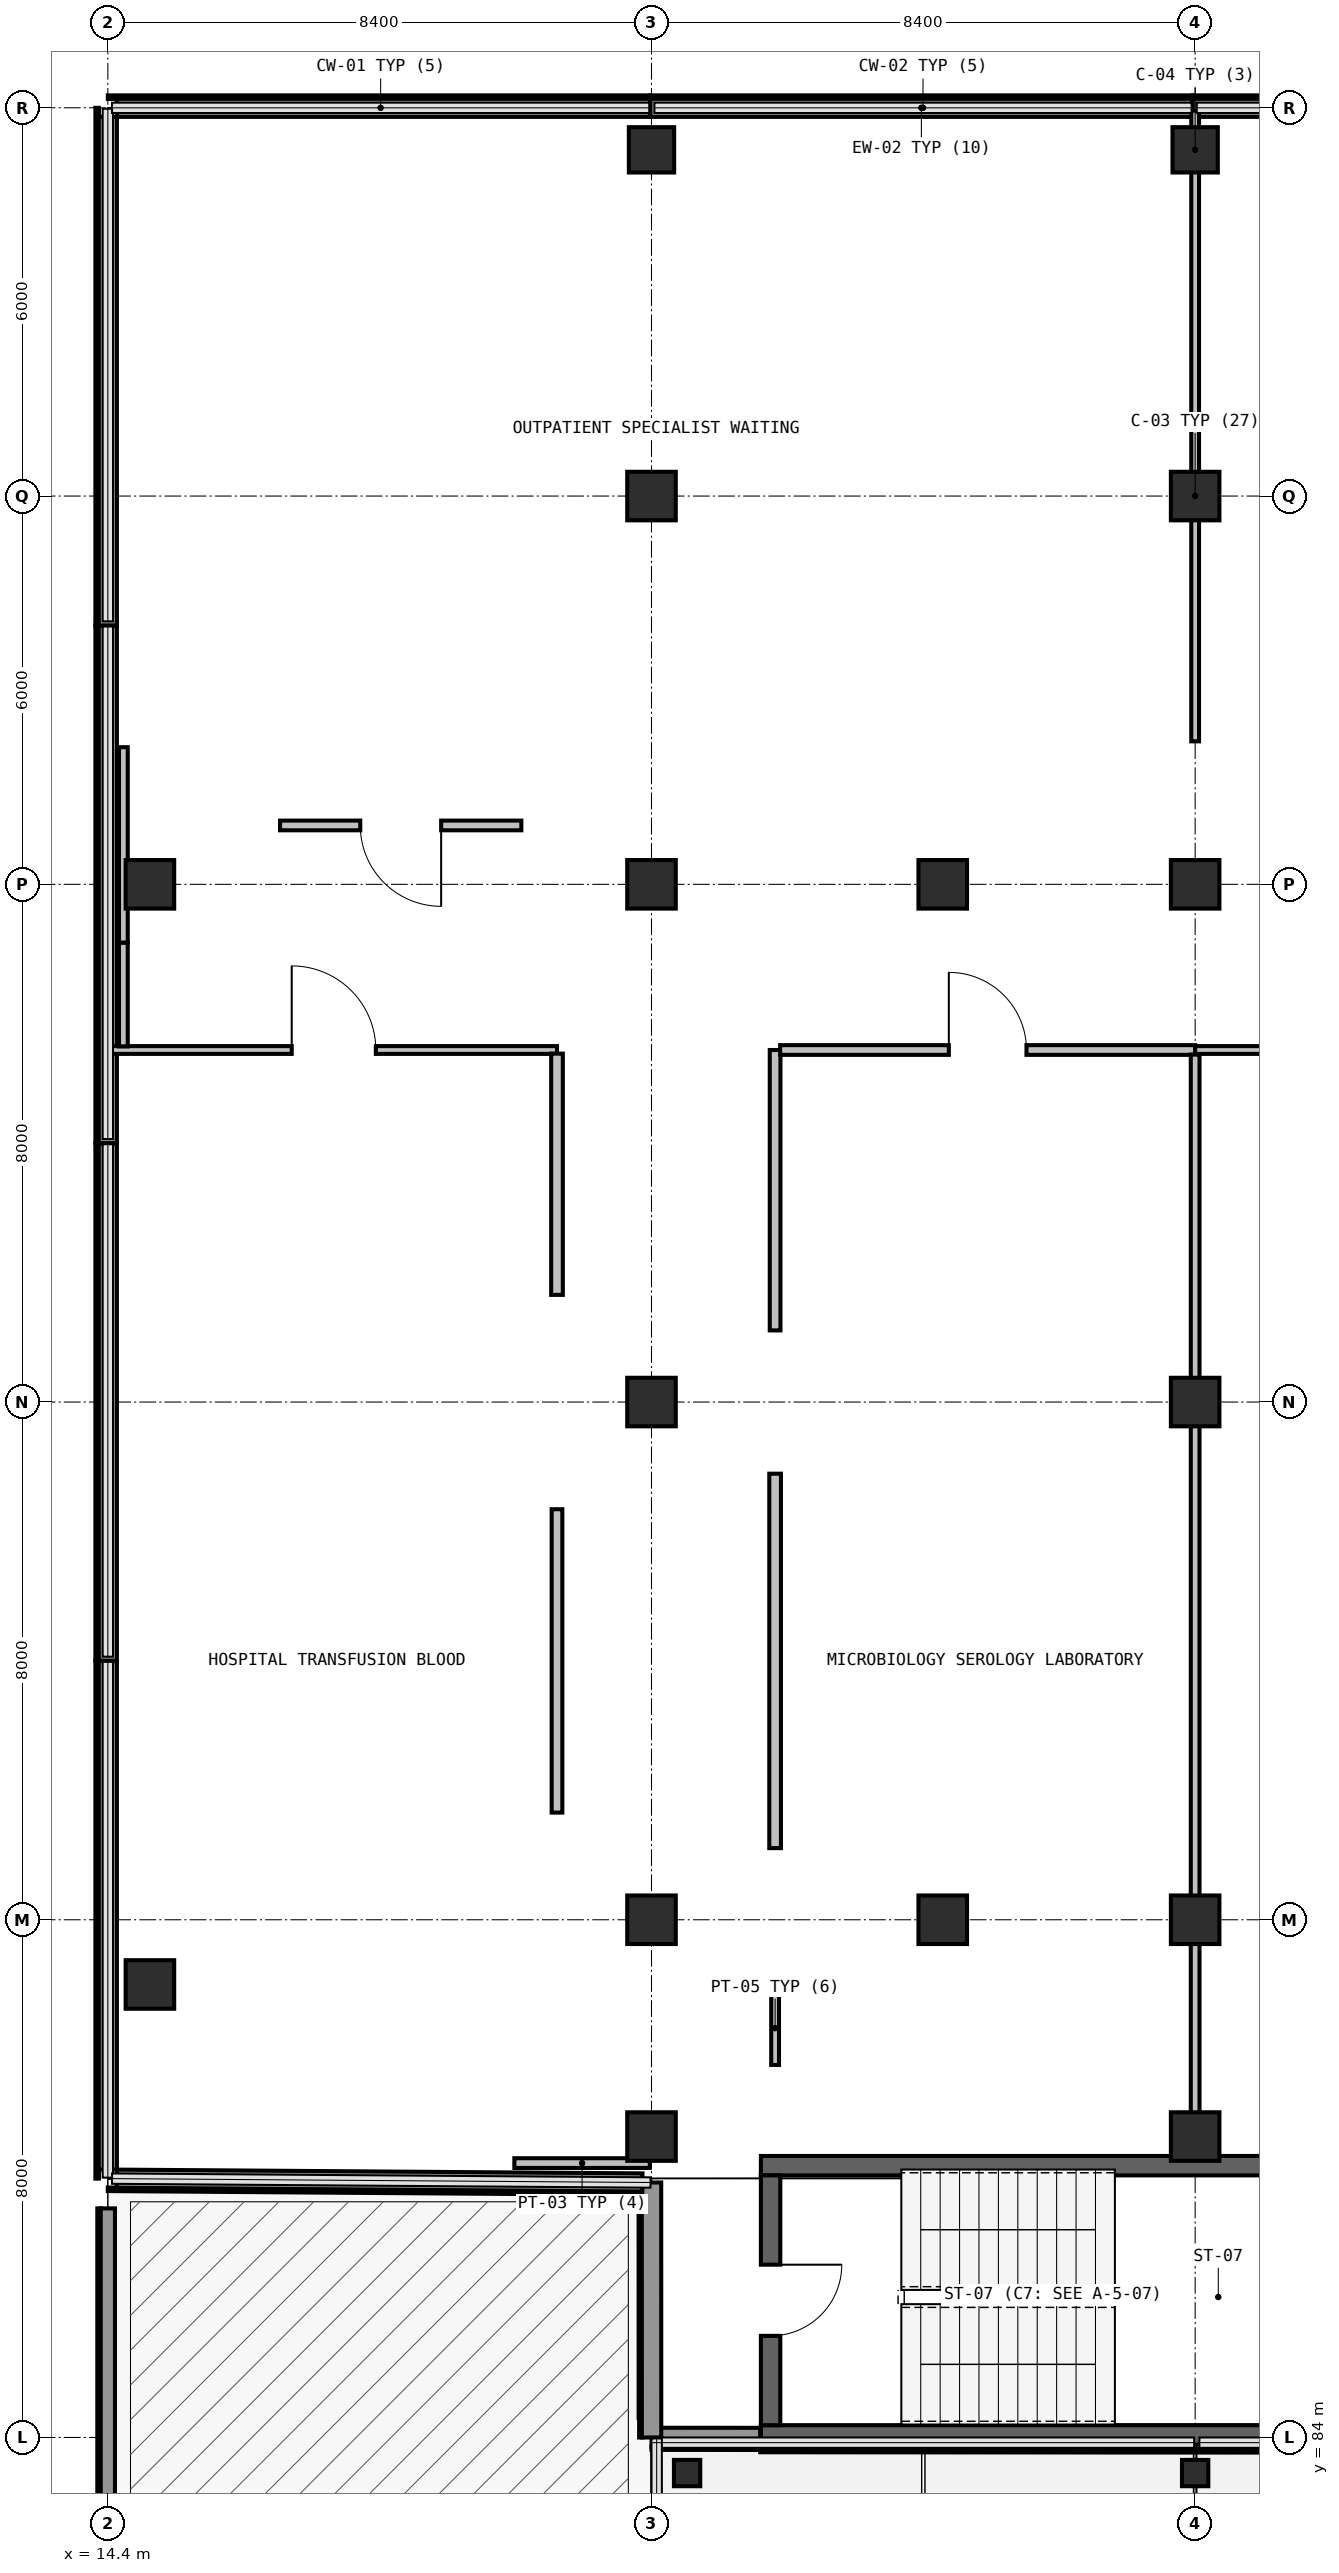
"""IFC4 building model, lengths in metres.
Left out: names, types, materials, properties, quantities, classifications, styles, units other than length and angle.
Written with IfcOpenShell. Run it as: python <this file> out.ifc"""

import sys

from ifc_helpers import new_model, si_unit, direction, frame, frame_2d, origin, origin_2d, place, context, subcontext, project, spatial, rectangle, hollow_circle, extrude, element, fill, save


model = new_model("IFC4")
c1 = context("Model", 3, precision=1e-05, world=origin(), true_north=direction((0.0, 1.0)))
c2 = subcontext(c1, "Body", "Model", "MODEL_VIEW")
j1 = project(units=[si_unit("LENGTHUNIT", "METRE"), si_unit("PLANEANGLEUNIT", "RADIAN")], contexts=[c1])
p1 = place(None, origin())
s1 = spatial("IfcSite", under=j1, at=p1, CompositionType="ELEMENT")
p2 = place(p1, origin())
s2 = spatial("IfcBuilding", under=s1, at=p2, CompositionType="ELEMENT")
p3 = place(p2, frame((0.0, 0.0, 15.0)))
s3 = spatial("IfcBuildingStorey", under=s2, at=p3, CompositionType="ELEMENT", Elevation=15.0)
for number, where, z_axis, x_axis in (
    (1, (23.35, 83.45, 0.0), (0.0, 0.0, 1.0), (1.0, 0.0, 0.0)),
    (2, (31.2, 83.45, 0.0), (0.0, 0.0, 1.0), (1.0, 0.0, 0.0)),
):
    element("IfcColumn", number, at=place(p3, frame(where, z_axis=z_axis, x_axis=x_axis)), inside=s3, PredefinedType="COLUMN", context=c2, shape_type="SweptSolid", body=[
        extrude(hollow_circle(Radius=0.203, WallThickness=0.016, at=origin_2d()), origin(), (0.0, 0.0, 1.0), 3.155),
    ])
for number, where, z_axis, x_axis in (
    (3, (15.05, 91.0, 0.0), (0.0, 0.0, 1.0), (1.0, 0.0, 0.0)),
    (4, (27.3, 92.0, 0.0), (0.0, 0.0, 1.0), (1.0, 0.0, 0.0)),
    (5, (27.3, 108.0, 0.0), (0.0, 0.0, 1.0), (1.0, 0.0, 0.0)),
    (6, (15.05, 108.0, 0.0), (0.0, 0.0, 1.0), (1.0, 0.0, 0.0)),
    (7, (22.8, 88.65, 0.0), (0.0, 0.0, 1.0), (1.0, 0.0, 0.0)),
    (8, (22.8, 92.0, 0.0), (0.0, 0.0, 1.0), (1.0, 0.0, 0.0)),
    (9, (22.8, 100.0, 0.0), (0.0, 0.0, 1.0), (1.0, 0.0, 0.0)),
    (10, (22.8, 108.0, 0.0), (0.0, 0.0, 1.0), (1.0, 0.0, 0.0)),
    (11, (22.8, 114.0, 0.0), (0.0, 0.0, 1.0), (1.0, 0.0, 0.0)),
):
    element("IfcColumn", number, at=place(p3, frame(where, z_axis=z_axis, x_axis=x_axis)), inside=s3, PredefinedType="COLUMN", context=c2, shape_type="SweptSolid", body=[
        extrude(rectangle(XDim=0.75, YDim=0.75, at=origin_2d()), origin(), (0.0, 0.0, 1.0), 4.2),
    ])
p4 = place(p3, frame((22.8, 119.35, 0.0), z_axis=(0.0, 0.0, 1.0), x_axis=(1.0, 0.0, 0.0)))
e12 = element("IfcColumn", 12, at=p4, inside=s3, PredefinedType="COLUMN", context=c2, shape_type="SweptSolid", body=[
    extrude(rectangle(XDim=0.7, YDim=0.7, at=origin_2d()), origin(), (0.0, 0.0, 1.0), 4.2),
])
for number, where, z_axis, x_axis in (
    (13, (31.2, 88.65, 0.0), (0.0, 0.0, 1.0), (1.0, 0.0, 0.0)),
    (14, (31.2, 92.0, 0.0), (0.0, 0.0, 1.0), (1.0, 0.0, 0.0)),
    (15, (31.2, 100.0, 0.0), (0.0, 0.0, 1.0), (1.0, 0.0, 0.0)),
    (16, (31.2, 108.0, 0.0), (0.0, 0.0, 1.0), (1.0, 0.0, 0.0)),
    (17, (31.2, 114.0, 0.0), (0.0, 0.0, 1.0), (1.0, 0.0, 0.0)),
):
    element("IfcColumn", number, at=place(p3, frame(where, z_axis=z_axis, x_axis=x_axis)), inside=s3, PredefinedType="COLUMN", context=c2, shape_type="SweptSolid", body=[
        extrude(rectangle(XDim=0.75, YDim=0.75, at=origin_2d()), origin(), (0.0, 0.0, 1.0), 4.2),
    ])
p5 = place(p3, frame((31.2, 119.35, 0.0), z_axis=(0.0, 0.0, 1.0), x_axis=(1.0, 0.0, 0.0)))
e18 = element("IfcColumn", 18, at=p5, inside=s3, PredefinedType="COLUMN", context=c2, shape_type="SweptSolid", body=[
    extrude(rectangle(XDim=0.7, YDim=0.7, at=origin_2d()), origin(), (0.0, 0.0, 1.0), 4.2),
])
p6 = place(p3, frame((14.4, 88.14, 0.0), z_axis=(0.0, 0.0, 1.0), x_axis=(0.0, 1.0, 0.0)))
e19 = element("IfcWall", 19, at=p6, inside=s3, PredefinedType="SOLIDWALL", context=c2, shape_type="SweptSolid", body=[
    extrude(rectangle(XDim=7.858, YDim=0.28, at=frame_2d((3.929, 0.0))), origin(), (0.0, 0.0, 1.0), 0.94),
])
p7 = place(p3, frame((14.4, 96.002, 0.0), z_axis=(0.0, 0.0, 1.0), x_axis=(0.0, 1.0, 0.0)))
e20 = element("IfcWall", 20, at=p7, inside=s3, PredefinedType="SOLIDWALL", context=c2, shape_type="SweptSolid", body=[
    extrude(rectangle(XDim=7.995, YDim=0.28, at=frame_2d((3.998, 0.0))), origin(), (0.0, 0.0, 1.0), 0.94),
])
p8 = place(p3, frame((14.4, 104.001, 0.0), z_axis=(0.0, 0.0, 1.0), x_axis=(0.0, 1.0, 0.0)))
e21 = element("IfcWall", 21, at=p8, inside=s3, PredefinedType="SOLIDWALL", context=c2, shape_type="SweptSolid", body=[
    extrude(rectangle(XDim=7.996, YDim=0.28, at=frame_2d((3.998, 0.0))), origin(), (0.0, 0.0, 1.0), 0.94),
])
p9 = place(p3, frame((14.4, 112.001, 0.0), z_axis=(0.0, 0.0, 1.0), x_axis=(0.0, 1.0, 0.0)))
e22 = element("IfcWall", 22, at=p9, inside=s3, PredefinedType="SOLIDWALL", context=c2, shape_type="SweptSolid", body=[
    extrude(rectangle(XDim=7.858, YDim=0.28, at=frame_2d((3.929, 0.0))), origin(), (0.0, 0.0, 1.0), 0.94),
])
p10 = place(p3, frame((14.54, 119.999, 0.0), z_axis=(0.0, 0.0, 1.0), x_axis=(1.0, 0.0, 0.0)))
e23 = element("IfcWall", 23, at=p10, inside=s3, PredefinedType="SOLIDWALL", context=c2, shape_type="SweptSolid", body=[
    extrude(rectangle(XDim=8.238, YDim=0.28, at=frame_2d((4.119, 0.0))), origin(), (0.0, 0.0, 1.0), 0.94),
])
for number, where, z_axis, x_axis in (
    (24, (22.782, 119.999, 0.0), (0.0, 0.0, 1.0), (1.0, 0.0, 0.0)),
    (25, (31.162, 119.999, 0.0), (0.0, 0.0, 1.0), (1.0, 0.0, 0.0)),
):
    element("IfcWall", number, at=place(p3, frame(where, z_axis=z_axis, x_axis=x_axis)), inside=s3, PredefinedType="SOLIDWALL", context=c2, shape_type="SweptSolid", body=[
        extrude(rectangle(XDim=8.376, YDim=0.28, at=frame_2d((4.188, 0.0))), origin(), (0.0, 0.0, 1.0), 0.94),
    ])
p11 = place(p3, frame((24.48, 83.999, 0.0), z_axis=(0.0, 0.0, 1.0), x_axis=(-0.999999830842, 0.000581648876, 0.0)))
e26 = element("IfcWall", 26, at=p11, inside=s3, PredefinedType="SOLIDWALL", context=c2, shape_type="SweptSolid", body=[
    extrude(rectangle(XDim=1.679, YDim=0.3, at=frame_2d((0.839, 0.0))), origin(), (0.0, 0.0, 1.0), 3.895),
])
p12 = place(p3, frame((22.801, 84.0, 0.0), z_axis=(0.0, 0.0, 1.0), x_axis=(-0.000247862181, 0.999999969282, 0.0)))
e27 = element("IfcWall", 27, at=p12, inside=s3, PredefinedType="SOLIDWALL", context=c2, shape_type="SweptSolid", body=[
    extrude(rectangle(XDim=3.94, YDim=0.3, at=frame_2d((1.97, 0.0))), origin(), (0.0, 0.0, 1.0), 3.895),
])
p13 = place(p3, frame((22.66, 87.941, 0.0), z_axis=(0.0, 0.0, 1.0), x_axis=(-0.999974397117, 0.007155774573, 0.0)))
e28 = element("IfcWall", 28, at=p13, inside=s3, PredefinedType="SOLIDWALL", context=c2, shape_type="SweptSolid", body=[
    extrude(rectangle(XDim=8.12, YDim=0.28, at=frame_2d((4.06, 0.0))), origin(), (0.0, 0.0, 1.0), 0.94),
])
p14 = place(p3, frame((14.4, 52.108, 0.05), z_axis=(0.0, 0.0, 1.0), x_axis=(0.0, 1.0, 0.0)))
e29 = element("IfcWall", 29, at=p14, inside=s3, PredefinedType="PARAPET", context=c2, shape_type="SweptSolid", body=[
    extrude(rectangle(XDim=35.432, YDim=0.22, at=frame_2d((17.716, 0.0))), origin(), (0.0, 0.0, 1.0), 1.15),
])
for number, where, z_axis, x_axis in (
    (30, (24.49, 84.04, 0.0), (0.0, 0.0, 1.0), (1.0, 0.0, 0.0)),
    (31, (33.51, 88.2, 0.0), (0.0, 0.0, 1.0), (-1.0, 0.0, 0.0)),
):
    element("IfcWall", number, at=place(p3, frame(where, z_axis=z_axis, x_axis=x_axis)), inside=s3, PredefinedType="SHEAR", context=c2, shape_type="SweptSolid", body=[
        extrude(rectangle(XDim=9.02, YDim=0.3, at=frame_2d((4.51, 0.0))), origin(), (0.0, 0.0, 1.0), 3.895),
    ])
p15 = place(p3, frame((24.64, 88.05, 0.0), z_axis=(0.0, 0.0, 1.0), x_axis=(0.0, -1.0, 0.0)))
e32 = element("IfcWall", 32, at=p15, inside=s3, PredefinedType="SHEAR", context=c2, shape_type="SweptSolid", body=[
    extrude(rectangle(XDim=3.86, YDim=0.3, at=frame_2d((1.93, 0.0))), origin(), (0.0, 0.0, 1.0), 3.895),
])
p16 = place(p15, frame((1.38, 0.0, 0.0)))
e33 = element("IfcOpeningElement", 33, at=p16, cuts=e32, PredefinedType="OPENING", context=c2, shape_type="SweptSolid", body=[
    extrude(rectangle(XDim=1.1, YDim=2.15, at=frame_2d((0.55, 1.075))), frame((0.0, 0.16, 0.0), z_axis=(0.0, -1.0, 0.0), x_axis=(1.0, 0.0, 0.0)), (0.0, 0.0, 1.0), 0.32),
])
p17 = place(p3, frame((24.71, 89.757, 0.0), z_axis=(0.0, 0.0, 1.0), x_axis=(0.0, 1.0, 0.0)))
e34 = element("IfcWall", 34, at=p17, inside=s3, PredefinedType="PARTITIONING", context=c2, shape_type="SweptSolid", body=[
    extrude(rectangle(XDim=1.136, YDim=0.12, at=frame_2d((0.568, 0.0))), origin(), (0.0, 0.0, 1.0), 3.895),
])
p18 = place(p3, frame((24.71, 93.107, 0.0), z_axis=(0.0, 0.0, 1.0), x_axis=(0.0, 1.0, 0.0)))
e35 = element("IfcWall", 35, at=p18, inside=s3, PredefinedType="PARTITIONING", context=c2, shape_type="SweptSolid", body=[
    extrude(rectangle(XDim=5.786, YDim=0.18, at=frame_2d((2.893, 0.0))), origin(), (0.0, 0.0, 1.0), 3.895),
])
p19 = place(p3, frame((24.71, 101.107, 0.0), z_axis=(0.0, 0.0, 1.0), x_axis=(0.0, 1.0, 0.0)))
e36 = element("IfcWall", 36, at=p19, inside=s3, PredefinedType="PARTITIONING", context=c2, shape_type="SweptSolid", body=[
    extrude(rectangle(XDim=4.333, YDim=0.165, at=frame_2d((2.167, 0.0))), origin(), (0.0, 0.0, 1.0), 3.895),
])
p20 = place(p3, frame((24.788, 105.44, 0.0), z_axis=(0.0, 0.0, 1.0), x_axis=(1.0, 0.0, 0.0)))
e37 = element("IfcWall", 37, at=p20, inside=s3, PredefinedType="PARTITIONING", context=c2, shape_type="SweptSolid", body=[
    extrude(rectangle(XDim=6.412, YDim=0.15, at=frame_2d((3.206, 0.0))), origin(), (0.0, 0.0, 1.0), 3.895),
])
p21 = place(p20, frame((2.606, 0.0, 0.0)))
e38 = element("IfcOpeningElement", 38, at=p21, cuts=e37, PredefinedType="OPENING", context=c2, shape_type="SweptSolid", body=[
    extrude(rectangle(XDim=1.2, YDim=2.15, at=frame_2d((0.6, 1.075))), frame((0.0, 0.085, 0.0), z_axis=(0.0, -1.0, 0.0), x_axis=(1.0, 0.0, 0.0)), (0.0, 0.0, 1.0), 0.17),
])
p22 = place(p3, frame((31.2, 105.369, 0.0), z_axis=(0.0, 0.0, 1.0), x_axis=(0.0, -1.0, 0.0)))
e39 = element("IfcWall", 39, at=p22, inside=s3, PredefinedType="PARTITIONING", context=c2, shape_type="SweptSolid", body=[
    extrude(rectangle(XDim=17.022, YDim=0.135, at=frame_2d((8.511, 0.0))), origin(), (0.0, 0.0, 1.0), 3.245),
])
p23 = place(p3, frame((14.442, 105.44, 0.0), z_axis=(0.0, 0.0, 1.0), x_axis=(1.0, 0.0, 0.0)))
e40 = element("IfcWall", 40, at=p23, inside=s3, PredefinedType="PARTITIONING", context=c2, shape_type="SweptSolid", body=[
    extrude(rectangle(XDim=6.898, YDim=0.12, at=frame_2d((3.449, 0.0))), origin(), (0.0, 0.0, 1.0), 3.895),
])
p24 = place(p23, frame((2.799, 0.0, 0.0)))
e41 = element("IfcOpeningElement", 41, at=p24, cuts=e40, PredefinedType="OPENING", context=c2, shape_type="SweptSolid", body=[
    extrude(rectangle(XDim=1.3, YDim=2.15, at=frame_2d((0.65, 1.075))), frame((0.0, 0.07, 0.0), z_axis=(0.0, -1.0, 0.0), x_axis=(1.0, 0.0, 0.0)), (0.0, 0.0, 1.0), 0.14),
])
p25 = place(p3, frame((21.34, 105.384, 0.0), z_axis=(0.0, 0.0, 1.0), x_axis=(0.0, -1.0, 0.0)))
e42 = element("IfcWall", 42, at=p25, inside=s3, PredefinedType="PARTITIONING", context=c2, shape_type="SweptSolid", body=[
    extrude(rectangle(XDim=3.728, YDim=0.18, at=frame_2d((1.864, 0.0))), origin(), (0.0, 0.0, 1.0), 3.895),
])
p26 = place(p3, frame((21.34, 98.344, 0.0), z_axis=(0.0, 0.0, 1.0), x_axis=(0.0, -1.0, 0.0)))
e43 = element("IfcWall", 43, at=p26, inside=s3, PredefinedType="PARTITIONING", context=c2, shape_type="SweptSolid", body=[
    extrude(rectangle(XDim=4.688, YDim=0.165, at=frame_2d((2.344, 0.0))), origin(), (0.0, 0.0, 1.0), 3.895),
])
p27 = place(p3, frame((20.681, 88.24, 0.0), z_axis=(0.0, 0.0, 1.0), x_axis=(1.0, 0.0, 0.0)))
e44 = element("IfcWall", 44, at=p27, inside=s3, PredefinedType="PARTITIONING", context=c2, shape_type="SweptSolid", body=[
    extrude(rectangle(XDim=2.093, YDim=0.15, at=frame_2d((1.046, 0.0))), origin(), (0.0, 0.0, 1.0), 3.895),
])
p28 = place(p3, frame((14.64, 107.1, 0.0), z_axis=(0.0, 0.0, 1.0), x_axis=(0.0, -1.0, 0.0)))
e45 = element("IfcWall", 45, at=p28, inside=s3, PredefinedType="PARTITIONING", context=c2, shape_type="SweptSolid", body=[
    extrude(rectangle(XDim=1.604, YDim=0.135, at=frame_2d((0.802, 0.0))), origin(), (0.0, 0.0, 1.0), 3.895),
])
p29 = place(p3, frame((31.2, 105.44, 0.0), z_axis=(0.0, 0.0, 1.0), x_axis=(1.0, 0.0, 0.0)))
e46 = element("IfcWall", 46, at=p29, inside=s3, PredefinedType="PARTITIONING", context=c2, shape_type="SweptSolid", body=[
    extrude(rectangle(XDim=8.4, YDim=0.12, at=frame_2d((4.2, 0.0))), origin(), (0.0, 0.0, 1.0), 3.895),
])
p30 = place(p29, frame((3.75, 0.0, 0.0)))
e47 = element("IfcOpeningElement", 47, at=p30, cuts=e46, PredefinedType="OPENING", context=c2, shape_type="SweptSolid", body=[
    extrude(rectangle(XDim=0.9, YDim=2.1, at=frame_2d((0.45, 1.05))), frame((0.0, 0.07, 0.0), z_axis=(0.0, -1.0, 0.0), x_axis=(1.0, 0.0, 0.0)), (0.0, 0.0, 1.0), 0.14),
])
p31 = place(p3, frame((20.789, 108.91, 0.0), z_axis=(0.0, 0.0, 1.0), x_axis=(-1.0, 0.0, 0.0)))
e48 = element("IfcWall", 48, at=p31, inside=s3, PredefinedType="PARTITIONING", context=c2, shape_type="SweptSolid", body=[
    extrude(rectangle(XDim=3.728, YDim=0.15, at=frame_2d((1.864, 0.0))), origin(), (0.0, 0.0, 1.0), 3.895),
])
p32 = place(p31, frame((1.239, 0.0, 0.0)))
e49 = element("IfcOpeningElement", 49, at=p32, cuts=e48, PredefinedType="OPENING", context=c2, shape_type="SweptSolid", body=[
    extrude(rectangle(XDim=1.25, YDim=2.15, at=frame_2d((0.625, 1.075))), frame((0.0, 0.085, 0.0), z_axis=(0.0, -1.0, 0.0), x_axis=(1.0, 0.0, 0.0)), (0.0, 0.0, 1.0), 0.17),
])
p33 = place(p3, frame((14.64, 110.119, 0.0), z_axis=(0.0, 0.0, 1.0), x_axis=(0.0, -1.0, 0.0)))
e50 = element("IfcWall", 50, at=p33, inside=s3, PredefinedType="PARTITIONING", context=c2, shape_type="SweptSolid", body=[
    extrude(rectangle(XDim=3.019, YDim=0.135, at=frame_2d((1.509, 0.0))), origin(), (0.0, 0.0, 1.0), 3.895),
])
p34 = place(p3, frame((31.2, 119.957, 0.0), z_axis=(0.0, 0.0, 1.0), x_axis=(0.0, -1.0, 0.0)))
e51 = element("IfcWall", 51, at=p34, inside=s3, PredefinedType="PARTITIONING", context=c2, shape_type="SweptSolid", body=[
    extrude(rectangle(XDim=9.747, YDim=0.12, at=frame_2d((4.874, 0.0))), origin(), (0.0, 0.0, 1.0), 3.245),
])
p35 = place(p16, origin())
e52 = element("IfcDoor", 52, at=p35, inside=s3, OperationType="SINGLE_SWING_RIGHT", PredefinedType="DOOR", context=c2, shape_type="SweptSolid", body=[
    extrude(rectangle(XDim=1.1, YDim=2.15, at=frame_2d((0.55, 1.075))), frame((0.0, 0.025, 0.0), z_axis=(0.0, -1.0, 0.0), x_axis=(1.0, 0.0, 0.0)), (0.0, 0.0, 1.0), 0.05),
])
fill(e33, e52)
p36 = place(p21, origin())
e53 = element("IfcDoor", 53, at=p36, inside=s3, OperationType="SINGLE_SWING_LEFT", PredefinedType="DOOR", context=c2, shape_type="SweptSolid", body=[
    extrude(rectangle(XDim=1.2, YDim=2.15, at=frame_2d((0.6, 1.075))), frame((0.0, 0.025, 0.0), z_axis=(0.0, -1.0, 0.0), x_axis=(1.0, 0.0, 0.0)), (0.0, 0.0, 1.0), 0.05),
])
fill(e38, e53)
p37 = place(p24, origin())
e54 = element("IfcDoor", 54, at=p37, inside=s3, OperationType="SINGLE_SWING_RIGHT", PredefinedType="DOOR", context=c2, shape_type="SweptSolid", body=[
    extrude(rectangle(XDim=1.3, YDim=2.15, at=frame_2d((0.65, 1.075))), frame((0.0, 0.025, 0.0), z_axis=(0.0, -1.0, 0.0), x_axis=(1.0, 0.0, 0.0)), (0.0, 0.0, 1.0), 0.05),
])
fill(e41, e54)
p38 = place(p32, origin())
e55 = element("IfcDoor", 55, at=p38, inside=s3, OperationType="SINGLE_SWING_RIGHT", PredefinedType="DOOR", context=c2, shape_type="SweptSolid", body=[
    extrude(rectangle(XDim=1.25, YDim=2.15, at=frame_2d((0.625, 1.075))), frame((0.0, 0.025, 0.0), z_axis=(0.0, -1.0, 0.0), x_axis=(1.0, 0.0, 0.0)), (0.0, 0.0, 1.0), 0.05),
])
fill(e49, e55)
save(model, sys.argv[1])
